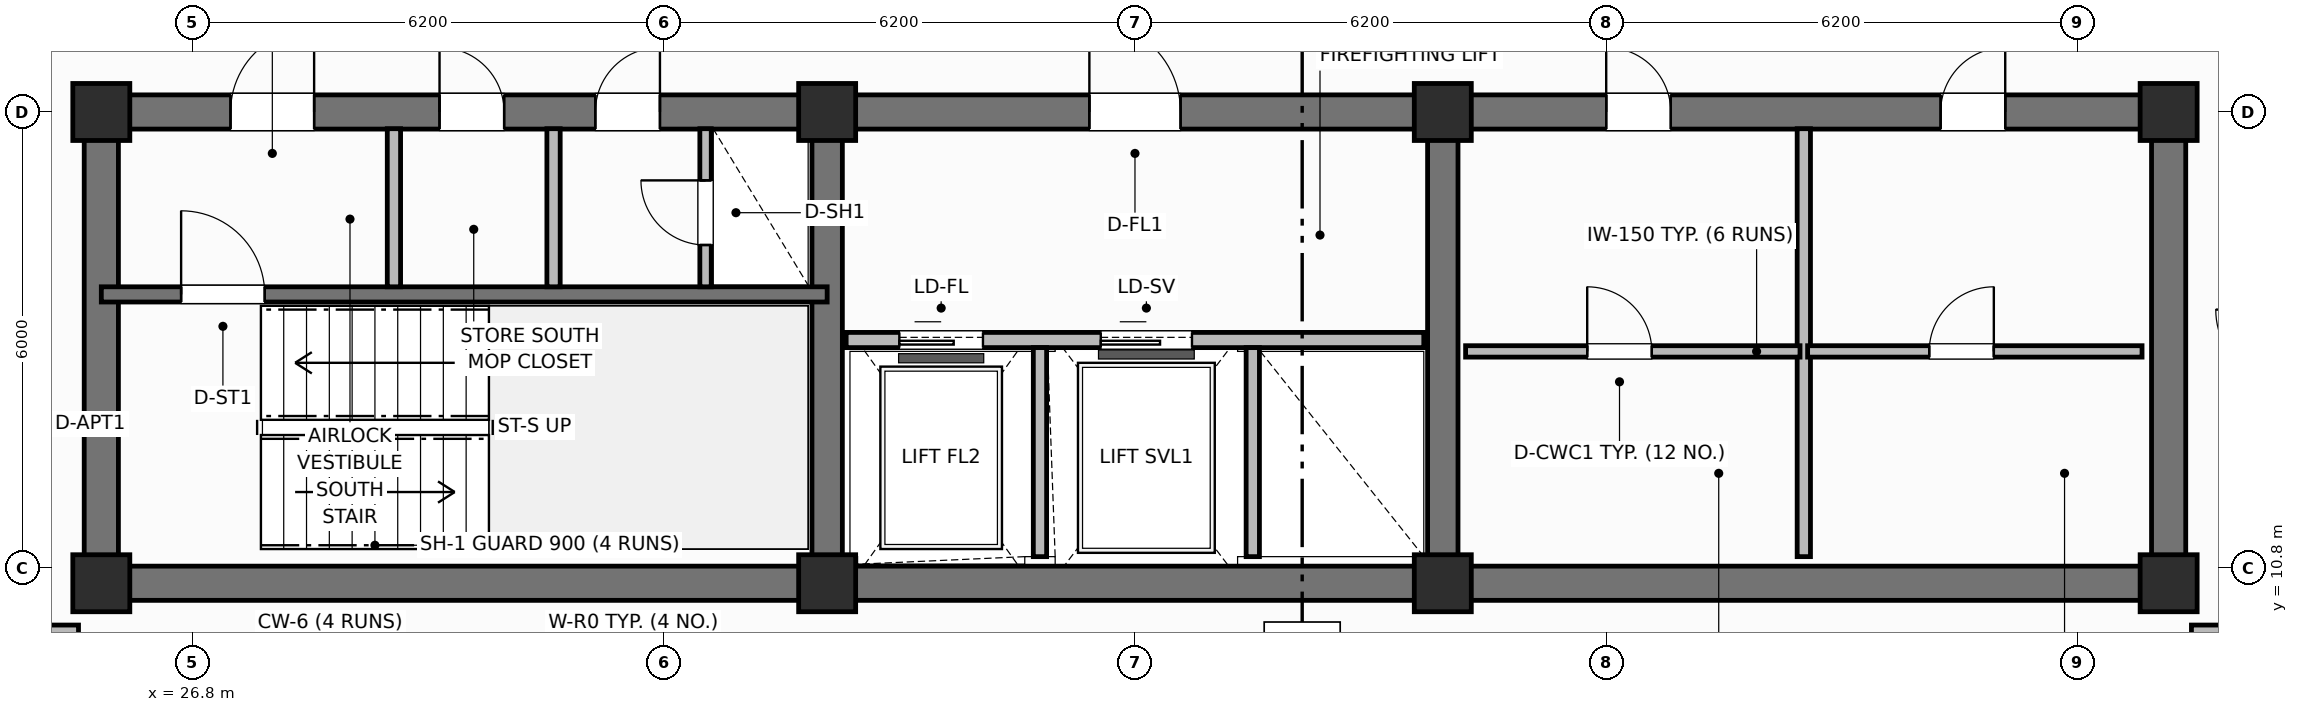
"""IFC4 building model, lengths in metres.
Left out: names, types, materials, properties, quantities, classifications, styles, units other than length and angle.
Written with IfcOpenShell. Run it as: python <this file> out.ifc"""

import sys

from ifc_helpers import new_model, si_unit, direction, frame, frame_2d, origin, origin_2d, place, context, subcontext, project, spatial, rectangle, extrude, element, fill, save


model = new_model("IFC4")
c1 = context("Model", 3, precision=1e-05, world=origin(), true_north=direction((0.0, 1.0)))
c2 = subcontext(c1, "Body", "Model", "MODEL_VIEW")
j1 = project(units=[si_unit("LENGTHUNIT", "METRE"), si_unit("PLANEANGLEUNIT", "RADIAN")], contexts=[c1])
p1 = place(None, origin())
s1 = spatial("IfcSite", under=j1, at=p1, CompositionType="ELEMENT")
p2 = place(p1, origin())
s2 = spatial("IfcBuilding", under=s1, at=p2, CompositionType="ELEMENT")
p3 = place(p2, frame((0.0, 0.0, 293.5)))
s3 = spatial("IfcBuildingStorey", under=s2, at=p3, CompositionType="ELEMENT", Elevation=293.5)
p4 = place(p3, frame((52.8, 10.6, 0.0), z_axis=(0.0, 0.0, 1.0), x_axis=(-1.0, 0.0, 0.0)))
e1 = element("IfcWall", 1, at=p4, inside=s3, PredefinedType="SHEAR", context=c2, shape_type="SweptSolid", body=[
    extrude(rectangle(XDim=27.2, YDim=0.45, at=frame_2d((13.6, 0.0))), origin(), (0.0, 0.0, 1.0), 3.7),
])
for number, where, z_axis, x_axis in (
    (2, (25.6, 10.825, 0.0), (0.0, 0.0, 1.0), (0.0, 1.0, 0.0)),
    (3, (52.8, 10.825, 0.0), (0.0, 0.0, 1.0), (0.0, 1.0, 0.0)),
):
    element("IfcWall", number, at=place(p3, frame(where, z_axis=z_axis, x_axis=x_axis)), inside=s3, PredefinedType="SHEAR", context=c2, shape_type="SweptSolid", body=[
        extrude(rectangle(XDim=5.75, YDim=0.45, at=frame_2d((2.875, 0.0))), origin(), (0.0, 0.0, 1.0), 3.7),
    ])
p5 = place(p3, frame((25.6, 16.8, 0.0), z_axis=(0.0, 0.0, 1.0), x_axis=(1.0, 0.0, 0.0)))
e4 = element("IfcWall", 4, at=p5, inside=s3, PredefinedType="SHEAR", context=c2, shape_type="SweptSolid", body=[
    extrude(rectangle(XDim=27.2, YDim=0.45, at=frame_2d((13.6, 0.0))), origin(), (0.0, 0.0, 1.0), 3.7),
])
p6 = place(p5, frame((1.7, 0.0, 0.0)))
e5 = element("IfcOpeningElement", 5, at=p6, cuts=e4, PredefinedType="OPENING", context=c2, shape_type="SweptSolid", body=[
    extrude(rectangle(XDim=1.1, YDim=2.15, at=frame_2d((0.55, 1.075))), frame((0.0, 0.235, 0.0), z_axis=(0.0, -1.0, 0.0), x_axis=(1.0, 0.0, 0.0)), (0.0, 0.0, 1.0), 0.47),
])
p7 = place(p5, frame((4.45, 0.0, 0.0)))
e6 = element("IfcOpeningElement", 6, at=p7, cuts=e4, PredefinedType="OPENING", context=c2, shape_type="SweptSolid", body=[
    extrude(rectangle(XDim=0.85, YDim=2.1, at=frame_2d((0.425, 1.05))), frame((0.0, 0.235, 0.0), z_axis=(0.0, -1.0, 0.0), x_axis=(1.0, 0.0, 0.0)), (0.0, 0.0, 1.0), 0.47),
])
p8 = place(p5, frame((6.5, 0.0, 0.0)))
e7 = element("IfcOpeningElement", 7, at=p8, cuts=e4, PredefinedType="OPENING", context=c2, shape_type="SweptSolid", body=[
    extrude(rectangle(XDim=0.85, YDim=2.1, at=frame_2d((0.425, 1.05))), frame((0.0, 0.235, 0.0), z_axis=(0.0, -1.0, 0.0), x_axis=(1.0, 0.0, 0.0)), (0.0, 0.0, 1.0), 0.47),
])
p9 = place(p5, frame((13.0, 0.0, 0.0)))
e8 = element("IfcOpeningElement", 8, at=p9, cuts=e4, PredefinedType="OPENING", context=c2, shape_type="SweptSolid", body=[
    extrude(rectangle(XDim=1.2, YDim=2.15, at=frame_2d((0.6, 1.075))), frame((0.0, 0.235, 0.0), z_axis=(0.0, -1.0, 0.0), x_axis=(1.0, 0.0, 0.0)), (0.0, 0.0, 1.0), 0.47),
])
p10 = place(p5, frame((19.8, 0.0, 0.0)))
e9 = element("IfcOpeningElement", 9, at=p10, cuts=e4, PredefinedType="OPENING", context=c2, shape_type="SweptSolid", body=[
    extrude(rectangle(XDim=0.85, YDim=2.1, at=frame_2d((0.425, 1.05))), frame((0.0, 0.235, 0.0), z_axis=(0.0, -1.0, 0.0), x_axis=(1.0, 0.0, 0.0)), (0.0, 0.0, 1.0), 0.47),
])
p11 = place(p5, frame((24.2, 0.0, 0.0)))
e10 = element("IfcOpeningElement", 10, at=p11, cuts=e4, PredefinedType="OPENING", context=c2, shape_type="SweptSolid", body=[
    extrude(rectangle(XDim=0.85, YDim=2.1, at=frame_2d((0.425, 1.05))), frame((0.0, 0.235, 0.0), z_axis=(0.0, -1.0, 0.0), x_axis=(1.0, 0.0, 0.0)), (0.0, 0.0, 1.0), 0.47),
])
for number, where, z_axis, x_axis in (
    (11, (35.15, 10.825, 0.0), (0.0, 0.0, 1.0), (0.0, 1.0, 0.0)),
    (12, (43.25, 10.825, 0.0), (0.0, 0.0, 1.0), (0.0, 1.0, 0.0)),
):
    element("IfcWall", number, at=place(p3, frame(where, z_axis=z_axis, x_axis=x_axis)), inside=s3, PredefinedType="SHEAR", context=c2, shape_type="SweptSolid", body=[
        extrude(rectangle(XDim=5.75, YDim=0.4, at=frame_2d((2.875, 0.0))), origin(), (0.0, 0.0, 1.0), 3.7),
    ])
for number, where, z_axis, x_axis in (
    (13, (25.6, 10.6, 0.0), (0.0, 0.0, 1.0), (1.0, 0.0, 0.0)),
    (14, (25.6, 16.8, 0.0), (0.0, 0.0, 1.0), (1.0, 0.0, 0.0)),
    (15, (35.15, 10.6, 0.0), (0.0, 0.0, 1.0), (1.0, 0.0, 0.0)),
    (16, (35.15, 16.8, 0.0), (0.0, 0.0, 1.0), (1.0, 0.0, 0.0)),
    (17, (43.25, 10.6, 0.0), (0.0, 0.0, 1.0), (1.0, 0.0, 0.0)),
    (18, (43.25, 16.8, 0.0), (0.0, 0.0, 1.0), (1.0, 0.0, 0.0)),
    (19, (52.8, 10.6, 0.0), (0.0, 0.0, 1.0), (1.0, 0.0, 0.0)),
    (20, (52.8, 16.8, 0.0), (0.0, 0.0, 1.0), (1.0, 0.0, 0.0)),
):
    element("IfcColumn", number, at=place(p3, frame(where, z_axis=z_axis, x_axis=x_axis)), inside=s3, PredefinedType="COLUMN", context=c2, shape_type="SweptSolid", body=[
        extrude(rectangle(XDim=0.75, YDim=0.75, at=origin_2d()), origin(), (0.0, 0.0, 1.0), 3.7),
    ])
p12 = place(p3, frame((25.6, 14.4, 0.0), z_axis=(0.0, 0.0, 1.0), x_axis=(1.0, 0.0, 0.0)))
e21 = element("IfcWall", 21, at=p12, inside=s3, PredefinedType="SHEAR", context=c2, shape_type="SweptSolid", body=[
    extrude(rectangle(XDim=9.55, YDim=0.2, at=frame_2d((4.775, 0.0))), origin(), (0.0, 0.0, 1.0), 3.7),
])
p13 = place(p12, frame((1.05, 0.0, 0.0)))
e22 = element("IfcOpeningElement", 22, at=p13, cuts=e21, PredefinedType="OPENING", context=c2, shape_type="SweptSolid", body=[
    extrude(rectangle(XDim=1.1, YDim=2.15, at=frame_2d((0.55, 1.075))), frame((0.0, 0.11, 0.0), z_axis=(0.0, -1.0, 0.0), x_axis=(1.0, 0.0, 0.0)), (0.0, 0.0, 1.0), 0.22),
])
for number, where, z_axis, x_axis in (
    (23, (29.45, 14.5, 0.0), (0.0, 0.0, 1.0), (0.0, 1.0, 0.0)),
    (24, (31.55, 14.5, 0.0), (0.0, 0.0, 1.0), (0.0, 1.0, 0.0)),
):
    element("IfcWall", number, at=place(p3, frame(where, z_axis=z_axis, x_axis=x_axis)), inside=s3, PredefinedType="PARTITIONING", context=c2, shape_type="SweptSolid", body=[
        extrude(rectangle(XDim=2.08, YDim=0.175, at=frame_2d((1.04, 0.0))), origin(), (0.0, 0.0, 1.0), 2.54),
    ])
p14 = place(p3, frame((33.55, 14.5, 0.0), z_axis=(0.0, 0.0, 1.0), x_axis=(0.0, 1.0, 0.0)))
e25 = element("IfcWall", 25, at=p14, inside=s3, PredefinedType="PARTITIONING", context=c2, shape_type="SweptSolid", body=[
    extrude(rectangle(XDim=2.08, YDim=0.15, at=frame_2d((1.04, 0.0))), origin(), (0.0, 0.0, 1.0), 2.54),
])
p15 = place(p14, frame((0.55, 0.0, 0.0)))
e26 = element("IfcOpeningElement", 26, at=p15, cuts=e25, PredefinedType="OPENING", context=c2, shape_type="SweptSolid", body=[
    extrude(rectangle(XDim=0.85, YDim=2.05, at=frame_2d((0.425, 1.025))), frame((0.0, 0.085, 0.0), z_axis=(0.0, -1.0, 0.0), x_axis=(1.0, 0.0, 0.0)), (0.0, 0.0, 1.0), 0.17),
])
p16 = place(p3, frame((35.4, 13.8, 0.0), z_axis=(0.0, 0.0, 1.0), x_axis=(1.0, 0.0, 0.0)))
e27 = element("IfcWall", 27, at=p16, inside=s3, PredefinedType="PARTITIONING", context=c2, shape_type="SweptSolid", body=[
    extrude(rectangle(XDim=7.6, YDim=0.2, at=frame_2d((3.8, 0.0))), origin(), (0.0, 0.0, 1.0), 2.31),
])
p17 = place(p16, frame((0.7, 0.0, 0.0)))
e28 = element("IfcOpeningElement", 28, at=p17, cuts=e27, PredefinedType="OPENING", context=c2, shape_type="SweptSolid", body=[
    extrude(rectangle(XDim=1.1, YDim=2.15, at=frame_2d((0.55, 1.075))), frame((0.0, 0.11, 0.0), z_axis=(0.0, -1.0, 0.0), x_axis=(1.0, 0.0, 0.0)), (0.0, 0.0, 1.0), 0.22),
])
p18 = place(p16, frame((3.35, 0.0, 0.0)))
e29 = element("IfcOpeningElement", 29, at=p18, cuts=e27, PredefinedType="OPENING", context=c2, shape_type="SweptSolid", body=[
    extrude(rectangle(XDim=1.2, YDim=2.15, at=frame_2d((0.6, 1.075))), frame((0.0, 0.11, 0.0), z_axis=(0.0, -1.0, 0.0), x_axis=(1.0, 0.0, 0.0)), (0.0, 0.0, 1.0), 0.22),
])
for number, where, z_axis, x_axis in (
    (30, (37.95, 10.95, 0.0), (0.0, 0.0, 1.0), (0.0, 1.0, 0.0)),
    (31, (40.75, 10.95, 0.0), (0.0, 0.0, 1.0), (0.0, 1.0, 0.0)),
):
    element("IfcWall", number, at=place(p3, frame(where, z_axis=z_axis, x_axis=x_axis)), inside=s3, PredefinedType="PARTITIONING", context=c2, shape_type="SweptSolid", body=[
        extrude(rectangle(XDim=2.75, YDim=0.175, at=frame_2d((1.375, 0.0))), origin(), (0.0, 0.0, 1.0), 2.54),
    ])
p19 = place(p3, frame((48.0, 10.95, 0.0), z_axis=(0.0, 0.0, 1.0), x_axis=(0.0, 1.0, 0.0)))
e32 = element("IfcWall", 32, at=p19, inside=s3, PredefinedType="PARTITIONING", context=c2, shape_type="SweptSolid", body=[
    extrude(rectangle(XDim=5.63, YDim=0.175, at=frame_2d((2.815, 0.0))), origin(), (0.0, 0.0, 1.0), 2.54),
])
p20 = place(p3, frame((43.55, 13.65, 0.0), z_axis=(0.0, 0.0, 1.0), x_axis=(1.0, 0.0, 0.0)))
e33 = element("IfcWall", 33, at=p20, inside=s3, PredefinedType="PARTITIONING", context=c2, shape_type="SweptSolid", body=[
    extrude(rectangle(XDim=4.4, YDim=0.15, at=frame_2d((2.2, 0.0))), origin(), (0.0, 0.0, 1.0), 2.54),
])
p21 = place(p20, frame((1.6, 0.0, 0.0)))
e34 = element("IfcOpeningElement", 34, at=p21, cuts=e33, PredefinedType="OPENING", context=c2, shape_type="SweptSolid", body=[
    extrude(rectangle(XDim=0.85, YDim=2.1, at=frame_2d((0.425, 1.05))), frame((0.0, 0.085, 0.0), z_axis=(0.0, -1.0, 0.0), x_axis=(1.0, 0.0, 0.0)), (0.0, 0.0, 1.0), 0.17),
])
p22 = place(p3, frame((48.05, 13.65, 0.0), z_axis=(0.0, 0.0, 1.0), x_axis=(1.0, 0.0, 0.0)))
e35 = element("IfcWall", 35, at=p22, inside=s3, PredefinedType="PARTITIONING", context=c2, shape_type="SweptSolid", body=[
    extrude(rectangle(XDim=4.4, YDim=0.15, at=frame_2d((2.2, 0.0))), origin(), (0.0, 0.0, 1.0), 2.54),
])
p23 = place(p22, frame((1.6, 0.0, 0.0)))
e36 = element("IfcOpeningElement", 36, at=p23, cuts=e35, PredefinedType="OPENING", context=c2, shape_type="SweptSolid", body=[
    extrude(rectangle(XDim=0.85, YDim=2.1, at=frame_2d((0.425, 1.05))), frame((0.0, 0.085, 0.0), z_axis=(0.0, -1.0, 0.0), x_axis=(1.0, 0.0, 0.0)), (0.0, 0.0, 1.0), 0.17),
])
p24 = place(p3, frame((21.546, 9.95, 0.0), z_axis=(0.0, 0.0, 1.0), x_axis=(1.0, 0.0, 0.0)))
e37 = element("IfcWall", 37, at=p24, inside=s3, PredefinedType="PARTITIONING", context=c2, shape_type="SweptSolid", body=[
    extrude(rectangle(XDim=3.754, YDim=0.2, at=frame_2d((1.877, 0.0))), origin(), (0.0, 0.0, 1.0), 2.54),
])
p25 = place(p3, frame((53.1, 9.95, 0.0), z_axis=(0.0, 0.0, 1.0), x_axis=(1.0, 0.0, 0.0)))
e38 = element("IfcWall", 38, at=p25, inside=s3, PredefinedType="PARTITIONING", context=c2, shape_type="SweptSolid", body=[
    extrude(rectangle(XDim=3.754, YDim=0.2, at=frame_2d((1.877, 0.0))), origin(), (0.0, 0.0, 1.0), 2.54),
])
p26 = place(p13, origin())
e39 = element("IfcDoor", 39, at=p26, inside=s3, OperationType="SINGLE_SWING_LEFT", PredefinedType="DOOR", context=c2, shape_type="SweptSolid", body=[
    extrude(rectangle(XDim=1.1, YDim=2.15, at=frame_2d((0.55, 1.075))), frame((0.0, 0.025, 0.0), z_axis=(0.0, -1.0, 0.0), x_axis=(1.0, 0.0, 0.0)), (0.0, 0.0, 1.0), 0.05),
])
fill(e22, e39)
p27 = place(p15, origin())
e40 = element("IfcDoor", 40, at=p27, inside=s3, OperationType="SINGLE_SWING_RIGHT", PredefinedType="TRAPDOOR", context=c2, shape_type="SweptSolid", body=[
    extrude(rectangle(XDim=0.85, YDim=2.05, at=frame_2d((0.425, 1.025))), frame((0.0, 0.025, 0.0), z_axis=(0.0, -1.0, 0.0), x_axis=(1.0, 0.0, 0.0)), (0.0, 0.0, 1.0), 0.05),
])
fill(e26, e40)
p28 = place(p17, origin())
e41 = element("IfcDoor", 41, at=p28, inside=s3, OperationType="SLIDING_TO_LEFT", PredefinedType="DOOR", context=c2, shape_type="SweptSolid", body=[
    extrude(rectangle(XDim=1.1, YDim=2.15, at=frame_2d((0.55, 1.075))), frame((0.0, 0.025, 0.0), z_axis=(0.0, -1.0, 0.0), x_axis=(1.0, 0.0, 0.0)), (0.0, 0.0, 1.0), 0.05),
])
fill(e28, e41)
p29 = place(p18, origin())
e42 = element("IfcDoor", 42, at=p29, inside=s3, OperationType="SLIDING_TO_LEFT", PredefinedType="DOOR", context=c2, shape_type="SweptSolid", body=[
    extrude(rectangle(XDim=1.2, YDim=2.15, at=frame_2d((0.6, 1.075))), frame((0.0, 0.025, 0.0), z_axis=(0.0, -1.0, 0.0), x_axis=(1.0, 0.0, 0.0)), (0.0, 0.0, 1.0), 0.05),
])
fill(e29, e42)
p30 = place(p21, origin())
e43 = element("IfcDoor", 43, at=p30, inside=s3, OperationType="SINGLE_SWING_LEFT", PredefinedType="DOOR", context=c2, shape_type="SweptSolid", body=[
    extrude(rectangle(XDim=0.85, YDim=2.1, at=frame_2d((0.425, 1.05))), frame((0.0, 0.025, 0.0), z_axis=(0.0, -1.0, 0.0), x_axis=(1.0, 0.0, 0.0)), (0.0, 0.0, 1.0), 0.05),
])
fill(e34, e43)
p31 = place(p23, origin())
e44 = element("IfcDoor", 44, at=p31, inside=s3, OperationType="SINGLE_SWING_RIGHT", PredefinedType="DOOR", context=c2, shape_type="SweptSolid", body=[
    extrude(rectangle(XDim=0.85, YDim=2.1, at=frame_2d((0.425, 1.05))), frame((0.0, 0.025, 0.0), z_axis=(0.0, -1.0, 0.0), x_axis=(1.0, 0.0, 0.0)), (0.0, 0.0, 1.0), 0.05),
])
fill(e36, e44)
p32 = place(p6, origin())
e45 = element("IfcDoor", 45, at=p32, inside=s3, OperationType="SINGLE_SWING_RIGHT", PredefinedType="DOOR", context=c2, shape_type="SweptSolid", body=[
    extrude(rectangle(XDim=1.1, YDim=2.15, at=frame_2d((0.55, 1.075))), frame((0.0, 0.025, 0.0), z_axis=(0.0, -1.0, 0.0), x_axis=(1.0, 0.0, 0.0)), (0.0, 0.0, 1.0), 0.05),
])
fill(e5, e45)
p33 = place(p7, origin())
e46 = element("IfcDoor", 46, at=p33, inside=s3, OperationType="SINGLE_SWING_LEFT", PredefinedType="DOOR", context=c2, shape_type="SweptSolid", body=[
    extrude(rectangle(XDim=0.85, YDim=2.1, at=frame_2d((0.425, 1.05))), frame((0.0, 0.025, 0.0), z_axis=(0.0, -1.0, 0.0), x_axis=(1.0, 0.0, 0.0)), (0.0, 0.0, 1.0), 0.05),
])
fill(e6, e46)
p34 = place(p8, origin())
e47 = element("IfcDoor", 47, at=p34, inside=s3, OperationType="SINGLE_SWING_RIGHT", PredefinedType="DOOR", context=c2, shape_type="SweptSolid", body=[
    extrude(rectangle(XDim=0.85, YDim=2.1, at=frame_2d((0.425, 1.05))), frame((0.0, 0.025, 0.0), z_axis=(0.0, -1.0, 0.0), x_axis=(1.0, 0.0, 0.0)), (0.0, 0.0, 1.0), 0.05),
])
fill(e7, e47)
p35 = place(p9, origin())
e48 = element("IfcDoor", 48, at=p35, inside=s3, OperationType="SINGLE_SWING_LEFT", PredefinedType="DOOR", context=c2, shape_type="SweptSolid", body=[
    extrude(rectangle(XDim=1.2, YDim=2.15, at=frame_2d((0.6, 1.075))), frame((0.0, 0.025, 0.0), z_axis=(0.0, -1.0, 0.0), x_axis=(1.0, 0.0, 0.0)), (0.0, 0.0, 1.0), 0.05),
])
fill(e8, e48)
p36 = place(p10, origin())
e49 = element("IfcDoor", 49, at=p36, inside=s3, OperationType="SINGLE_SWING_LEFT", PredefinedType="DOOR", context=c2, shape_type="SweptSolid", body=[
    extrude(rectangle(XDim=0.85, YDim=2.1, at=frame_2d((0.425, 1.05))), frame((0.0, 0.025, 0.0), z_axis=(0.0, -1.0, 0.0), x_axis=(1.0, 0.0, 0.0)), (0.0, 0.0, 1.0), 0.05),
])
fill(e9, e49)
p37 = place(p11, origin())
e50 = element("IfcDoor", 50, at=p37, inside=s3, OperationType="SINGLE_SWING_RIGHT", PredefinedType="DOOR", context=c2, shape_type="SweptSolid", body=[
    extrude(rectangle(XDim=0.85, YDim=2.1, at=frame_2d((0.425, 1.05))), frame((0.0, 0.025, 0.0), z_axis=(0.0, -1.0, 0.0), x_axis=(1.0, 0.0, 0.0)), (0.0, 0.0, 1.0), 0.05),
])
fill(e10, e50)
save(model, sys.argv[1])
